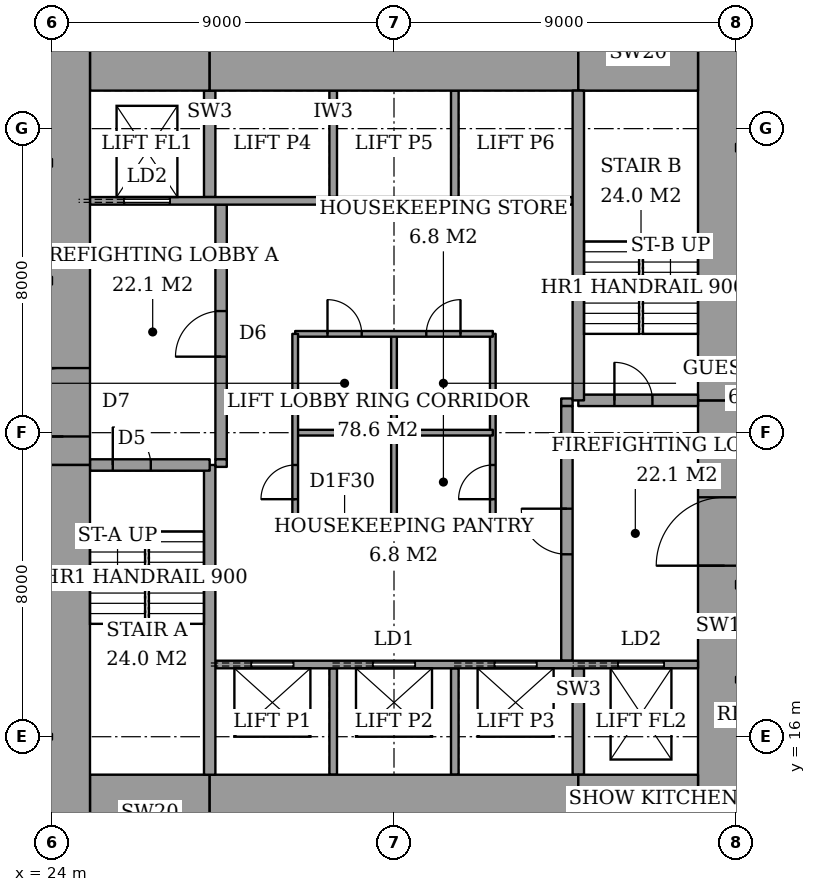
"""IFC4 building model, lengths in metres.
Left out: names, types, materials, properties, quantities, classifications, styles, units other than length and angle.
Written with IfcOpenShell. Run it as: python <this file> out.ifc"""

import sys

from ifc_helpers import new_model, si_unit, direction, frame, frame_2d, origin, place, context, subcontext, project, spatial, rectangle, extrude, element, fill, save


model = new_model("IFC4")
c1 = context("Model", 3, precision=1e-05, world=origin(), true_north=direction((0.0, 1.0)))
c2 = subcontext(c1, "Body", "Model", "MODEL_VIEW")
j1 = project(units=[si_unit("LENGTHUNIT", "METRE"), si_unit("PLANEANGLEUNIT", "RADIAN")], contexts=[c1])
p1 = place(None, origin())
s1 = spatial("IfcSite", under=j1, at=p1, CompositionType="ELEMENT")
p2 = place(p1, origin())
s2 = spatial("IfcBuilding", under=s1, at=p2, CompositionType="ELEMENT")
p3 = place(p2, frame((0.0, 0.0, 51.2)))
s3 = spatial("IfcBuildingStorey", under=s2, at=p3, CompositionType="ELEMENT", Elevation=51.2)
p4 = place(p3, frame((25.0, 14.0, 0.0), z_axis=(0.0, 0.0, 1.0), x_axis=(1.0, 0.0, 0.0)))
e1 = element("IfcWall", 1, at=p4, inside=s3, PredefinedType="SHEAR", context=c2, shape_type="SweptSolid", body=[
    extrude(rectangle(XDim=3.15, YDim=2.0, at=frame_2d((1.575, 0.0))), origin(), (0.0, 0.0, 1.0), 3.6),
])
p5 = place(p3, frame((28.15, 14.0, 0.0), z_axis=(0.0, 0.0, 1.0), x_axis=(1.0, 0.0, 0.0)))
e2 = element("IfcWall", 2, at=p5, inside=s3, PredefinedType="SHEAR", context=c2, shape_type="SweptSolid", body=[
    extrude(rectangle(XDim=9.7, YDim=2.0, at=frame_2d((4.85, 0.0))), origin(), (0.0, 0.0, 1.0), 3.6),
])
for number, where, z_axis, x_axis in (
    (3, (37.85, 14.0, 0.0), (0.0, 0.0, 1.0), (1.0, 0.0, 0.0)),
    (4, (25.0, 34.0, 0.0), (0.0, 0.0, 1.0), (1.0, 0.0, 0.0)),
):
    element("IfcWall", number, at=place(p3, frame(where, z_axis=z_axis, x_axis=x_axis)), inside=s3, PredefinedType="SHEAR", context=c2, shape_type="SweptSolid", body=[
        extrude(rectangle(XDim=3.15, YDim=2.0, at=frame_2d((1.575, 0.0))), origin(), (0.0, 0.0, 1.0), 3.6),
    ])
p6 = place(p3, frame((28.15, 34.0, 0.0), z_axis=(0.0, 0.0, 1.0), x_axis=(1.0, 0.0, 0.0)))
e5 = element("IfcWall", 5, at=p6, inside=s3, PredefinedType="SHEAR", context=c2, shape_type="SweptSolid", body=[
    extrude(rectangle(XDim=9.7, YDim=2.0, at=frame_2d((4.85, 0.0))), origin(), (0.0, 0.0, 1.0), 3.6),
])
p7 = place(p3, frame((37.85, 34.0, 0.0), z_axis=(0.0, 0.0, 1.0), x_axis=(1.0, 0.0, 0.0)))
e6 = element("IfcWall", 6, at=p7, inside=s3, PredefinedType="SHEAR", context=c2, shape_type="SweptSolid", body=[
    extrude(rectangle(XDim=3.15, YDim=2.0, at=frame_2d((1.575, 0.0))), origin(), (0.0, 0.0, 1.0), 3.6),
])
p8 = place(p3, frame((24.3, 13.0, 0.0), z_axis=(0.0, 0.0, 1.0), x_axis=(0.0, 1.0, 0.0)))
e7 = element("IfcWall", 7, at=p8, inside=s3, PredefinedType="SHEAR", context=c2, shape_type="SweptSolid", body=[
    extrude(rectangle(XDim=10.15, YDim=1.4, at=frame_2d((5.075, 0.0))), origin(), (0.0, 0.0, 1.0), 3.6),
])
p9 = place(p3, frame((24.3, 23.15, 0.0), z_axis=(0.0, 0.0, 1.0), x_axis=(0.0, 1.0, 0.0)))
e8 = element("IfcWall", 8, at=p9, inside=s3, PredefinedType="SHEAR", context=c2, shape_type="SweptSolid", body=[
    extrude(rectangle(XDim=11.85, YDim=1.4, at=frame_2d((5.925, 0.0))), origin(), (0.0, 0.0, 1.0), 3.6),
])
p10 = place(p9, frame((0.75, 0.0, 0.0)))
e9 = element("IfcOpeningElement", 9, at=p10, cuts=e8, PredefinedType="OPENING", context=c2, shape_type="SweptSolid", body=[
    extrude(rectangle(XDim=1.8, YDim=2.4, at=frame_2d((0.9, 1.2))), frame((0.0, 0.71, 0.0), z_axis=(0.0, -1.0, 0.0), x_axis=(1.0, 0.0, 0.0)), (0.0, 0.0, 1.0), 1.42),
])
p11 = place(p3, frame((41.7, 13.0, 0.0), z_axis=(0.0, 0.0, 1.0), x_axis=(0.0, 1.0, 0.0)))
e10 = element("IfcWall", 10, at=p11, inside=s3, PredefinedType="SHEAR", context=c2, shape_type="SweptSolid", body=[
    extrude(rectangle(XDim=11.85, YDim=1.4, at=frame_2d((5.925, 0.0))), origin(), (0.0, 0.0, 1.0), 3.6),
])
p12 = place(p11, frame((7.5, 0.0, 0.0)))
e11 = element("IfcOpeningElement", 11, at=p12, cuts=e10, PredefinedType="OPENING", context=c2, shape_type="SweptSolid", body=[
    extrude(rectangle(XDim=1.8, YDim=2.4, at=frame_2d((0.9, 1.2))), frame((0.0, 0.71, 0.0), z_axis=(0.0, -1.0, 0.0), x_axis=(1.0, 0.0, 0.0)), (0.0, 0.0, 1.0), 1.42),
])
p13 = place(p3, frame((41.7, 24.85, 0.0), z_axis=(0.0, 0.0, 1.0), x_axis=(0.0, 1.0, 0.0)))
e12 = element("IfcWall", 12, at=p13, inside=s3, PredefinedType="SHEAR", context=c2, shape_type="SweptSolid", body=[
    extrude(rectangle(XDim=10.15, YDim=1.4, at=frame_2d((5.075, 0.0))), origin(), (0.0, 0.0, 1.0), 3.6),
])
p14 = place(p3, frame((28.15, 15.0, 0.0), z_axis=(0.0, 0.0, 1.0), x_axis=(0.0, 1.0, 0.0)))
e13 = element("IfcWall", 13, at=p14, inside=s3, PredefinedType="SHEAR", context=c2, shape_type="SweptSolid", body=[
    extrude(rectangle(XDim=8.15, YDim=0.3, at=frame_2d((4.075, 0.0))), origin(), (0.0, 0.0, 1.0), 3.6),
])
p15 = place(p3, frame((25.0, 23.15, 0.0), z_axis=(0.0, 0.0, 1.0), x_axis=(1.0, 0.0, 0.0)))
e14 = element("IfcWall", 14, at=p15, inside=s3, PredefinedType="SHEAR", context=c2, shape_type="SweptSolid", body=[
    extrude(rectangle(XDim=3.15, YDim=0.3, at=frame_2d((1.575, 0.0))), origin(), (0.0, 0.0, 1.0), 3.6),
])
p16 = place(p15, frame((0.6, 0.0, 0.0)))
e15 = element("IfcOpeningElement", 15, at=p16, cuts=e14, PredefinedType="OPENING", context=c2, shape_type="SweptSolid", body=[
    extrude(rectangle(XDim=1.0, YDim=2.1, at=frame_2d((0.5, 1.05))), frame((0.0, 0.16, 0.0), z_axis=(0.0, -1.0, 0.0), x_axis=(1.0, 0.0, 0.0)), (0.0, 0.0, 1.0), 0.32),
])
p17 = place(p3, frame((37.85, 24.85, 0.0), z_axis=(0.0, 0.0, 1.0), x_axis=(0.0, 1.0, 0.0)))
e16 = element("IfcWall", 16, at=p17, inside=s3, PredefinedType="SHEAR", context=c2, shape_type="SweptSolid", body=[
    extrude(rectangle(XDim=8.15, YDim=0.3, at=frame_2d((4.075, 0.0))), origin(), (0.0, 0.0, 1.0), 3.6),
])
p18 = place(p3, frame((37.85, 24.85, 0.0), z_axis=(0.0, 0.0, 1.0), x_axis=(1.0, 0.0, 0.0)))
e17 = element("IfcWall", 17, at=p18, inside=s3, PredefinedType="SHEAR", context=c2, shape_type="SweptSolid", body=[
    extrude(rectangle(XDim=3.15, YDim=0.3, at=frame_2d((1.575, 0.0))), origin(), (0.0, 0.0, 1.0), 3.6),
])
p19 = place(p18, frame((0.95, 0.0, 0.0)))
e18 = element("IfcOpeningElement", 18, at=p19, cuts=e17, PredefinedType="OPENING", context=c2, shape_type="SweptSolid", body=[
    extrude(rectangle(XDim=1.0, YDim=2.1, at=frame_2d((0.5, 1.05))), frame((0.0, 0.16, 0.0), z_axis=(0.0, -1.0, 0.0), x_axis=(1.0, 0.0, 0.0)), (0.0, 0.0, 1.0), 0.32),
])
p20 = place(p3, frame((28.45, 23.3, 0.0), z_axis=(0.0, 0.0, 1.0), x_axis=(0.0, 1.0, 0.0)))
e19 = element("IfcWall", 19, at=p20, inside=s3, PredefinedType="PARTITIONING", context=c2, shape_type="SweptSolid", body=[
    extrude(rectangle(XDim=6.7, YDim=0.3, at=frame_2d((3.35, 0.0))), origin(), (0.0, 0.0, 1.0), 3.6),
])
p21 = place(p20, frame((2.7, 0.0, 0.0)))
e20 = element("IfcOpeningElement", 20, at=p21, cuts=e19, PredefinedType="OPENING", context=c2, shape_type="SweptSolid", body=[
    extrude(rectangle(XDim=1.2, YDim=2.1, at=frame_2d((0.6, 1.05))), frame((0.0, 0.16, 0.0), z_axis=(0.0, -1.0, 0.0), x_axis=(1.0, 0.0, 0.0)), (0.0, 0.0, 1.0), 0.32),
])
p22 = place(p3, frame((37.55, 18.0, 0.0), z_axis=(0.0, 0.0, 1.0), x_axis=(0.0, 1.0, 0.0)))
e21 = element("IfcWall", 21, at=p22, inside=s3, PredefinedType="PARTITIONING", context=c2, shape_type="SweptSolid", body=[
    extrude(rectangle(XDim=6.7, YDim=0.3, at=frame_2d((3.35, 0.0))), origin(), (0.0, 0.0, 1.0), 3.6),
])
p23 = place(p22, frame((2.8, 0.0, 0.0)))
e22 = element("IfcOpeningElement", 22, at=p23, cuts=e21, PredefinedType="OPENING", context=c2, shape_type="SweptSolid", body=[
    extrude(rectangle(XDim=1.2, YDim=2.1, at=frame_2d((0.6, 1.05))), frame((0.0, 0.16, 0.0), z_axis=(0.0, -1.0, 0.0), x_axis=(1.0, 0.0, 0.0)), (0.0, 0.0, 1.0), 0.32),
])
p24 = place(p3, frame((28.3, 17.9, 0.0), z_axis=(0.0, 0.0, 1.0), x_axis=(1.0, 0.0, 0.0)))
e23 = element("IfcWall", 23, at=p24, inside=s3, PredefinedType="PARTITIONING", context=c2, shape_type="SweptSolid", body=[
    extrude(rectangle(XDim=12.7, YDim=0.2, at=frame_2d((6.35, 0.0))), origin(), (0.0, 0.0, 1.0), 3.6),
])
p25 = place(p24, frame((0.95, 0.0, 0.0)))
e24 = element("IfcOpeningElement", 24, at=p25, cuts=e23, PredefinedType="OPENING", context=c2, shape_type="SweptSolid", body=[
    extrude(rectangle(XDim=1.1, YDim=2.1, at=frame_2d((0.55, 1.05))), frame((0.0, 0.11, 0.0), z_axis=(0.0, -1.0, 0.0), x_axis=(1.0, 0.0, 0.0)), (0.0, 0.0, 1.0), 0.22),
])
p26 = place(p24, frame((4.15, 0.0, 0.0)))
e25 = element("IfcOpeningElement", 25, at=p26, cuts=e23, PredefinedType="OPENING", context=c2, shape_type="SweptSolid", body=[
    extrude(rectangle(XDim=1.1, YDim=2.1, at=frame_2d((0.55, 1.05))), frame((0.0, 0.11, 0.0), z_axis=(0.0, -1.0, 0.0), x_axis=(1.0, 0.0, 0.0)), (0.0, 0.0, 1.0), 0.22),
])
p27 = place(p24, frame((7.35, 0.0, 0.0)))
e26 = element("IfcOpeningElement", 26, at=p27, cuts=e23, PredefinedType="OPENING", context=c2, shape_type="SweptSolid", body=[
    extrude(rectangle(XDim=1.1, YDim=2.1, at=frame_2d((0.55, 1.05))), frame((0.0, 0.11, 0.0), z_axis=(0.0, -1.0, 0.0), x_axis=(1.0, 0.0, 0.0)), (0.0, 0.0, 1.0), 0.22),
])
p28 = place(p24, frame((10.6, 0.0, 0.0)))
e27 = element("IfcOpeningElement", 27, at=p28, cuts=e23, PredefinedType="OPENING", context=c2, shape_type="SweptSolid", body=[
    extrude(rectangle(XDim=1.2, YDim=2.1, at=frame_2d((0.6, 1.05))), frame((0.0, 0.11, 0.0), z_axis=(0.0, -1.0, 0.0), x_axis=(1.0, 0.0, 0.0)), (0.0, 0.0, 1.0), 0.22),
])
p29 = place(p3, frame((25.0, 30.1, 0.0), z_axis=(0.0, 0.0, 1.0), x_axis=(1.0, 0.0, 0.0)))
e28 = element("IfcWall", 28, at=p29, inside=s3, PredefinedType="PARTITIONING", context=c2, shape_type="SweptSolid", body=[
    extrude(rectangle(XDim=12.7, YDim=0.2, at=frame_2d((6.35, 0.0))), origin(), (0.0, 0.0, 1.0), 3.6),
])
p30 = place(p29, frame((0.9, 0.0, 0.0)))
e29 = element("IfcOpeningElement", 29, at=p30, cuts=e28, PredefinedType="OPENING", context=c2, shape_type="SweptSolid", body=[
    extrude(rectangle(XDim=1.2, YDim=2.1, at=frame_2d((0.6, 1.05))), frame((0.0, 0.11, 0.0), z_axis=(0.0, -1.0, 0.0), x_axis=(1.0, 0.0, 0.0)), (0.0, 0.0, 1.0), 0.22),
])
for number, where, z_axis, x_axis in (
    (30, (31.4, 15.0, 0.0), (0.0, 0.0, 1.0), (0.0, 1.0, 0.0)),
    (31, (34.6, 15.0, 0.0), (0.0, 0.0, 1.0), (0.0, 1.0, 0.0)),
):
    element("IfcWall", number, at=place(p3, frame(where, z_axis=z_axis, x_axis=x_axis)), inside=s3, PredefinedType="PARTITIONING", context=c2, shape_type="SweptSolid", body=[
        extrude(rectangle(XDim=2.8, YDim=0.2, at=frame_2d((1.4, 0.0))), origin(), (0.0, 0.0, 1.0), 3.6),
    ])
p31 = place(p3, frame((37.85, 15.0, 0.0), z_axis=(0.0, 0.0, 1.0), x_axis=(0.0, 1.0, 0.0)))
e32 = element("IfcWall", 32, at=p31, inside=s3, PredefinedType="SHEAR", context=c2, shape_type="SweptSolid", body=[
    extrude(rectangle(XDim=2.8, YDim=0.3, at=frame_2d((1.4, 0.0))), origin(), (0.0, 0.0, 1.0), 3.6),
])
for number, where, z_axis, x_axis in (
    (33, (31.4, 30.2, 0.0), (0.0, 0.0, 1.0), (0.0, 1.0, 0.0)),
    (34, (34.6, 30.2, 0.0), (0.0, 0.0, 1.0), (0.0, 1.0, 0.0)),
):
    element("IfcWall", number, at=place(p3, frame(where, z_axis=z_axis, x_axis=x_axis)), inside=s3, PredefinedType="PARTITIONING", context=c2, shape_type="SweptSolid", body=[
        extrude(rectangle(XDim=2.8, YDim=0.2, at=frame_2d((1.4, 0.0))), origin(), (0.0, 0.0, 1.0), 3.6),
    ])
p32 = place(p3, frame((28.15, 30.2, 0.0), z_axis=(0.0, 0.0, 1.0), x_axis=(0.0, 1.0, 0.0)))
e35 = element("IfcWall", 35, at=p32, inside=s3, PredefinedType="SHEAR", context=c2, shape_type="SweptSolid", body=[
    extrude(rectangle(XDim=2.8, YDim=0.3, at=frame_2d((1.4, 0.0))), origin(), (0.0, 0.0, 1.0), 3.6),
])
for number, where, z_axis, x_axis in (
    (36, (28.3, 23.2, 0.0), (0.0, 0.0, 1.0), (1.0, 0.0, 0.0)),
    (37, (37.4, 24.8, 0.0), (0.0, 0.0, 1.0), (1.0, 0.0, 0.0)),
):
    element("IfcWall", number, at=place(p3, frame(where, z_axis=z_axis, x_axis=x_axis)), inside=s3, PredefinedType="PARTITIONING", context=c2, shape_type="SweptSolid", body=[
        extrude(rectangle(XDim=0.3, YDim=0.2, at=frame_2d((0.15, 0.0))), origin(), (0.0, 0.0, 1.0), 3.6),
    ])
p33 = place(p3, frame((30.4, 21.4, 0.0), z_axis=(0.0, 0.0, 1.0), x_axis=(1.0, 0.0, 0.0)))
e38 = element("IfcWall", 38, at=p33, inside=s3, PredefinedType="PARTITIONING", context=c2, shape_type="SweptSolid", body=[
    extrude(rectangle(XDim=5.2, YDim=0.15, at=frame_2d((2.6, 0.0))), origin(), (0.0, 0.0, 1.0), 3.35),
])
p34 = place(p3, frame((30.4, 26.6, 0.0), z_axis=(0.0, 0.0, 1.0), x_axis=(1.0, 0.0, 0.0)))
e39 = element("IfcWall", 39, at=p34, inside=s3, PredefinedType="PARTITIONING", context=c2, shape_type="SweptSolid", body=[
    extrude(rectangle(XDim=5.2, YDim=0.15, at=frame_2d((2.6, 0.0))), origin(), (0.0, 0.0, 1.0), 3.35),
])
p35 = place(p34, frame((0.85, 0.0, 0.0)))
e40 = element("IfcOpeningElement", 40, at=p35, cuts=e39, PredefinedType="OPENING", context=c2, shape_type="SweptSolid", body=[
    extrude(rectangle(XDim=0.9, YDim=2.1, at=frame_2d((0.45, 1.05))), frame((0.0, 0.085, 0.0), z_axis=(0.0, -1.0, 0.0), x_axis=(1.0, 0.0, 0.0)), (0.0, 0.0, 1.0), 0.17),
])
p36 = place(p34, frame((3.45, 0.0, 0.0)))
e41 = element("IfcOpeningElement", 41, at=p36, cuts=e39, PredefinedType="OPENING", context=c2, shape_type="SweptSolid", body=[
    extrude(rectangle(XDim=0.9, YDim=2.1, at=frame_2d((0.45, 1.05))), frame((0.0, 0.085, 0.0), z_axis=(0.0, -1.0, 0.0), x_axis=(1.0, 0.0, 0.0)), (0.0, 0.0, 1.0), 0.17),
])
p37 = place(p3, frame((30.4, 21.4, 0.0), z_axis=(0.0, 0.0, 1.0), x_axis=(0.0, 1.0, 0.0)))
e42 = element("IfcWall", 42, at=p37, inside=s3, PredefinedType="PARTITIONING", context=c2, shape_type="SweptSolid", body=[
    extrude(rectangle(XDim=5.2, YDim=0.15, at=frame_2d((2.6, 0.0))), origin(), (0.0, 0.0, 1.0), 3.35),
])
p38 = place(p37, frame((0.85, 0.0, 0.0)))
e43 = element("IfcOpeningElement", 43, at=p38, cuts=e42, PredefinedType="OPENING", context=c2, shape_type="SweptSolid", body=[
    extrude(rectangle(XDim=0.9, YDim=2.1, at=frame_2d((0.45, 1.05))), frame((0.0, 0.085, 0.0), z_axis=(0.0, -1.0, 0.0), x_axis=(1.0, 0.0, 0.0)), (0.0, 0.0, 1.0), 0.17),
])
p39 = place(p3, frame((35.6, 21.4, 0.0), z_axis=(0.0, 0.0, 1.0), x_axis=(0.0, 1.0, 0.0)))
e44 = element("IfcWall", 44, at=p39, inside=s3, PredefinedType="PARTITIONING", context=c2, shape_type="SweptSolid", body=[
    extrude(rectangle(XDim=5.2, YDim=0.15, at=frame_2d((2.6, 0.0))), origin(), (0.0, 0.0, 1.0), 3.35),
])
p40 = place(p39, frame((0.85, 0.0, 0.0)))
e45 = element("IfcOpeningElement", 45, at=p40, cuts=e44, PredefinedType="OPENING", context=c2, shape_type="SweptSolid", body=[
    extrude(rectangle(XDim=0.9, YDim=2.1, at=frame_2d((0.45, 1.05))), frame((0.0, 0.085, 0.0), z_axis=(0.0, -1.0, 0.0), x_axis=(1.0, 0.0, 0.0)), (0.0, 0.0, 1.0), 0.17),
])
for number, where, z_axis, x_axis in (
    (46, (30.4, 24.0, 0.0), (0.0, 0.0, 1.0), (1.0, 0.0, 0.0)),
    (47, (33.0, 21.4, 0.0), (0.0, 0.0, 1.0), (0.0, 1.0, 0.0)),
):
    element("IfcWall", number, at=place(p3, frame(where, z_axis=z_axis, x_axis=x_axis)), inside=s3, PredefinedType="PARTITIONING", context=c2, shape_type="SweptSolid", body=[
        extrude(rectangle(XDim=5.2, YDim=0.15, at=frame_2d((2.6, 0.0))), origin(), (0.0, 0.0, 1.0), 3.35),
    ])
p41 = place(p16, origin())
e48 = element("IfcDoor", 48, at=p41, inside=s3, OperationType="SINGLE_SWING_RIGHT", PredefinedType="DOOR", context=c2, shape_type="SweptSolid", body=[
    extrude(rectangle(XDim=1.0, YDim=2.1, at=frame_2d((0.5, 1.05))), frame((0.0, 0.025, 0.0), z_axis=(0.0, -1.0, 0.0), x_axis=(1.0, 0.0, 0.0)), (0.0, 0.0, 1.0), 0.05),
])
fill(e15, e48)
p42 = place(p19, origin())
e49 = element("IfcDoor", 49, at=p42, inside=s3, OperationType="SINGLE_SWING_RIGHT", PredefinedType="DOOR", context=c2, shape_type="SweptSolid", body=[
    extrude(rectangle(XDim=1.0, YDim=2.1, at=frame_2d((0.5, 1.05))), frame((0.0, 0.025, 0.0), z_axis=(0.0, -1.0, 0.0), x_axis=(1.0, 0.0, 0.0)), (0.0, 0.0, 1.0), 0.05),
])
fill(e18, e49)
p43 = place(p21, origin())
e50 = element("IfcDoor", 50, at=p43, inside=s3, OperationType="SINGLE_SWING_RIGHT", PredefinedType="DOOR", context=c2, shape_type="SweptSolid", body=[
    extrude(rectangle(XDim=1.2, YDim=2.1, at=frame_2d((0.6, 1.05))), frame((0.0, 0.025, 0.0), z_axis=(0.0, -1.0, 0.0), x_axis=(1.0, 0.0, 0.0)), (0.0, 0.0, 1.0), 0.05),
])
fill(e20, e50)
p44 = place(p23, origin())
e51 = element("IfcDoor", 51, at=p44, inside=s3, OperationType="SINGLE_SWING_LEFT", PredefinedType="DOOR", context=c2, shape_type="SweptSolid", body=[
    extrude(rectangle(XDim=1.2, YDim=2.1, at=frame_2d((0.6, 1.05))), frame((0.0, 0.025, 0.0), z_axis=(0.0, -1.0, 0.0), x_axis=(1.0, 0.0, 0.0)), (0.0, 0.0, 1.0), 0.05),
])
fill(e22, e51)
p45 = place(p10, origin())
e52 = element("IfcDoor", 52, at=p45, inside=s3, OperationType="DOUBLE_DOOR_DOUBLE_SWING", PredefinedType="DOOR", context=c2, shape_type="SweptSolid", body=[
    extrude(rectangle(XDim=1.8, YDim=2.4, at=frame_2d((0.9, 1.2))), frame((0.0, 0.025, 0.0), z_axis=(0.0, -1.0, 0.0), x_axis=(1.0, 0.0, 0.0)), (0.0, 0.0, 1.0), 0.05),
])
fill(e9, e52)
p46 = place(p12, origin())
e53 = element("IfcDoor", 53, at=p46, inside=s3, OperationType="DOUBLE_DOOR_DOUBLE_SWING", PredefinedType="DOOR", context=c2, shape_type="SweptSolid", body=[
    extrude(rectangle(XDim=1.8, YDim=2.4, at=frame_2d((0.9, 1.2))), frame((0.0, 0.025, 0.0), z_axis=(0.0, -1.0, 0.0), x_axis=(1.0, 0.0, 0.0)), (0.0, 0.0, 1.0), 0.05),
])
fill(e11, e53)
p47 = place(p38, origin())
e54 = element("IfcDoor", 54, at=p47, inside=s3, OperationType="SINGLE_SWING_RIGHT", PredefinedType="DOOR", context=c2, shape_type="SweptSolid", body=[
    extrude(rectangle(XDim=0.9, YDim=2.1, at=frame_2d((0.45, 1.05))), frame((0.0, 0.025, 0.0), z_axis=(0.0, -1.0, 0.0), x_axis=(1.0, 0.0, 0.0)), (0.0, 0.0, 1.0), 0.05),
])
fill(e43, e54)
p48 = place(p40, origin())
e55 = element("IfcDoor", 55, at=p48, inside=s3, OperationType="SINGLE_SWING_RIGHT", PredefinedType="DOOR", context=c2, shape_type="SweptSolid", body=[
    extrude(rectangle(XDim=0.9, YDim=2.1, at=frame_2d((0.45, 1.05))), frame((0.0, 0.025, 0.0), z_axis=(0.0, -1.0, 0.0), x_axis=(1.0, 0.0, 0.0)), (0.0, 0.0, 1.0), 0.05),
])
fill(e45, e55)
p49 = place(p35, origin())
e56 = element("IfcDoor", 56, at=p49, inside=s3, OperationType="SINGLE_SWING_RIGHT", PredefinedType="DOOR", context=c2, shape_type="SweptSolid", body=[
    extrude(rectangle(XDim=0.9, YDim=2.1, at=frame_2d((0.45, 1.05))), frame((0.0, 0.025, 0.0), z_axis=(0.0, -1.0, 0.0), x_axis=(1.0, 0.0, 0.0)), (0.0, 0.0, 1.0), 0.05),
])
fill(e40, e56)
p50 = place(p36, origin())
e57 = element("IfcDoor", 57, at=p50, inside=s3, OperationType="SINGLE_SWING_LEFT", PredefinedType="DOOR", context=c2, shape_type="SweptSolid", body=[
    extrude(rectangle(XDim=0.9, YDim=2.1, at=frame_2d((0.45, 1.05))), frame((0.0, 0.025, 0.0), z_axis=(0.0, -1.0, 0.0), x_axis=(1.0, 0.0, 0.0)), (0.0, 0.0, 1.0), 0.05),
])
fill(e41, e57)
p51 = place(p25, origin())
e58 = element("IfcDoor", 58, at=p51, inside=s3, OperationType="SLIDING_TO_LEFT", PredefinedType="DOOR", context=c2, shape_type="SweptSolid", body=[
    extrude(rectangle(XDim=1.1, YDim=2.1, at=frame_2d((0.55, 1.05))), frame((0.0, 0.025, 0.0), z_axis=(0.0, -1.0, 0.0), x_axis=(1.0, 0.0, 0.0)), (0.0, 0.0, 1.0), 0.05),
])
fill(e24, e58)
p52 = place(p26, origin())
e59 = element("IfcDoor", 59, at=p52, inside=s3, OperationType="SLIDING_TO_LEFT", PredefinedType="DOOR", context=c2, shape_type="SweptSolid", body=[
    extrude(rectangle(XDim=1.1, YDim=2.1, at=frame_2d((0.55, 1.05))), frame((0.0, 0.025, 0.0), z_axis=(0.0, -1.0, 0.0), x_axis=(1.0, 0.0, 0.0)), (0.0, 0.0, 1.0), 0.05),
])
fill(e25, e59)
p53 = place(p27, origin())
e60 = element("IfcDoor", 60, at=p53, inside=s3, OperationType="SLIDING_TO_LEFT", PredefinedType="DOOR", context=c2, shape_type="SweptSolid", body=[
    extrude(rectangle(XDim=1.1, YDim=2.1, at=frame_2d((0.55, 1.05))), frame((0.0, 0.025, 0.0), z_axis=(0.0, -1.0, 0.0), x_axis=(1.0, 0.0, 0.0)), (0.0, 0.0, 1.0), 0.05),
])
fill(e26, e60)
p54 = place(p30, origin())
e61 = element("IfcDoor", 61, at=p54, inside=s3, OperationType="SLIDING_TO_LEFT", PredefinedType="DOOR", context=c2, shape_type="SweptSolid", body=[
    extrude(rectangle(XDim=1.2, YDim=2.1, at=frame_2d((0.6, 1.05))), frame((0.0, 0.025, 0.0), z_axis=(0.0, -1.0, 0.0), x_axis=(1.0, 0.0, 0.0)), (0.0, 0.0, 1.0), 0.05),
])
fill(e29, e61)
p55 = place(p28, origin())
e62 = element("IfcDoor", 62, at=p55, inside=s3, OperationType="SLIDING_TO_LEFT", PredefinedType="DOOR", context=c2, shape_type="SweptSolid", body=[
    extrude(rectangle(XDim=1.2, YDim=2.1, at=frame_2d((0.6, 1.05))), frame((0.0, 0.025, 0.0), z_axis=(0.0, -1.0, 0.0), x_axis=(1.0, 0.0, 0.0)), (0.0, 0.0, 1.0), 0.05),
])
fill(e27, e62)
save(model, sys.argv[1])
